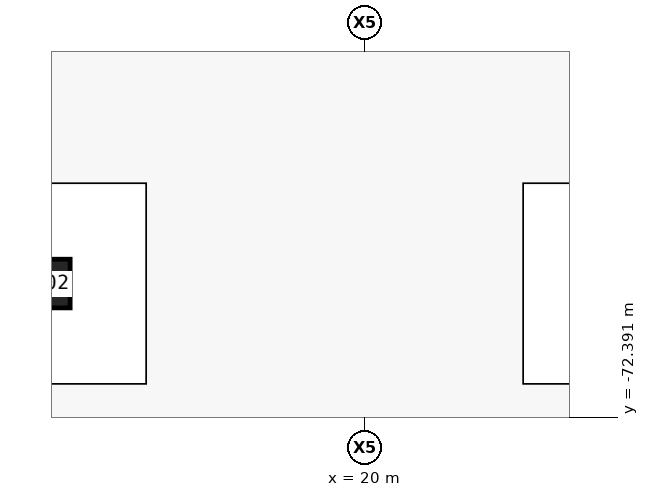
"""IFC4 building model, lengths in metres.
Left out: names, types, materials, properties, quantities, classifications, styles, units other than length and angle.
Written with IfcOpenShell. Run it as: python <this file> out.ifc"""

import sys

from ifc_helpers import new_model, si_unit, direction, frame, origin, origin_2d, place, context, subcontext, project, spatial, rectangle, extrude, element, save


model = new_model("IFC4")
c1 = context("Model", 3, precision=1e-05, world=origin(), true_north=direction((0.0, 1.0)))
c2 = subcontext(c1, "Body", "Model", "MODEL_VIEW")
j1 = project(units=[si_unit("LENGTHUNIT", "METRE"), si_unit("PLANEANGLEUNIT", "RADIAN")], contexts=[c1])
p1 = place(None, origin())
s1 = spatial("IfcSite", under=j1, at=p1, CompositionType="ELEMENT")
p2 = place(p1, origin())
s2 = spatial("IfcBuilding", under=s1, at=p2, CompositionType="ELEMENT")
p3 = place(p2, frame((0.0, 0.0, -9.0)))
s3 = spatial("IfcBuildingStorey", under=s2, at=p3, CompositionType="ELEMENT", Elevation=-9.0)
p4 = place(p3, frame((9.5, -68.0, 0.0), z_axis=(0.0, 0.0, 1.0), x_axis=(1.0, 0.0, 0.0)))
e1 = element("IfcColumn", 1, at=p4, inside=s3, PredefinedType="COLUMN", context=c2, shape_type="SweptSolid", body=[
    extrude(rectangle(XDim=1.6, YDim=1.6, at=origin_2d()), origin(), (0.0, 0.0, 1.0), 4.5),
])
save(model, sys.argv[1])
